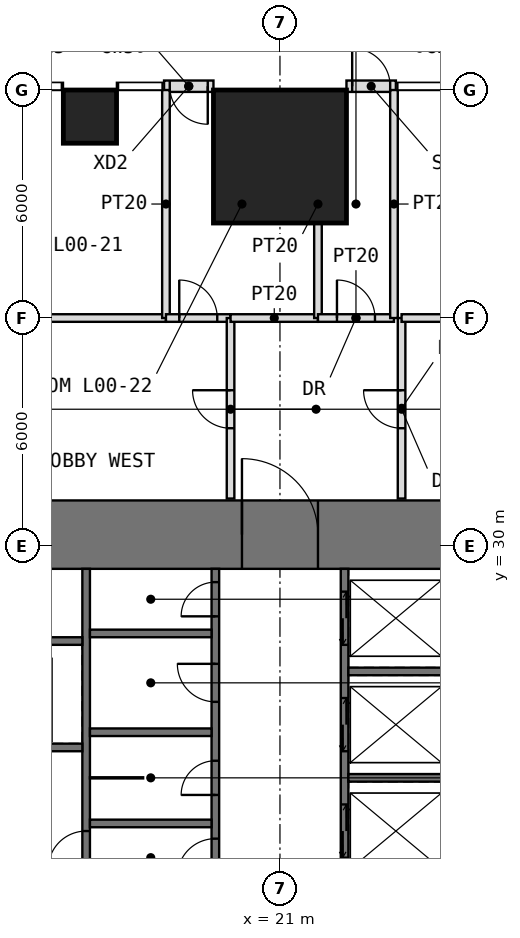
"""IFC4 building model, lengths in metres.
Left out: names, types, materials, properties, quantities, classifications, styles, units other than length and angle.
Written with IfcOpenShell. Run it as: python <this file> out.ifc"""

import sys

from ifc_helpers import new_model, si_unit, direction, frame, frame_2d, origin, origin_2d, place, context, subcontext, project, spatial, rectangle, extrude, element, fill, save


model = new_model("IFC4")
c1 = context("Model", 3, precision=1e-05, world=origin(), true_north=direction((0.0, 1.0)))
c2 = subcontext(c1, "Body", "Model", "MODEL_VIEW")
j1 = project(units=[si_unit("LENGTHUNIT", "METRE"), si_unit("PLANEANGLEUNIT", "RADIAN")], contexts=[c1])
p1 = place(None, origin())
s1 = spatial("IfcSite", under=j1, at=p1, CompositionType="ELEMENT")
p2 = place(p1, origin())
s2 = spatial("IfcBuilding", under=s1, at=p2, CompositionType="ELEMENT")
p3 = place(p2, origin())
s3 = spatial("IfcBuildingStorey", under=s2, at=p3, CompositionType="ELEMENT", Elevation=0.0)
p4 = place(p3, frame((16.0, 41.3, -0.4), z_axis=(0.0, 0.0, 1.0), x_axis=(1.0, 0.0, 0.0)))
e1 = element("IfcColumn", 1, at=p4, inside=s3, PredefinedType="COLUMN", context=c2, shape_type="SweptSolid", body=[
    extrude(rectangle(XDim=1.4, YDim=1.4, at=origin_2d()), origin(), (0.0, 0.0, 1.0), 6.4),
])
p5 = place(p3, frame((21.0, 40.25, -0.4), z_axis=(0.0, 0.0, 1.0), x_axis=(1.0, 0.0, 0.0)))
e2 = element("IfcColumn", 2, at=p5, inside=s3, PredefinedType="COLUMN", context=c2, shape_type="SweptSolid", body=[
    extrude(rectangle(XDim=3.5, YDim=3.5, at=origin_2d()), origin(), (0.0, 0.0, 1.0), 6.4),
])
p6 = place(p3, frame((22.75, 42.1, 0.0), z_axis=(0.0, 0.0, 1.0), x_axis=(1.0, 0.0, 0.0)))
e3 = element("IfcWall", 3, at=p6, inside=s3, PredefinedType="USERDEFINED", context=c2, shape_type="SweptSolid", body=[
    extrude(rectangle(XDim=1.3, YDim=0.3, at=frame_2d((0.65, 0.0))), origin(), (0.0, 0.0, 1.0), 5.6),
])
p7 = place(p6, frame((0.15, 0.0, 0.0)))
e4 = element("IfcOpeningElement", 4, at=p7, cuts=e3, PredefinedType="OPENING", context=c2, shape_type="SweptSolid", body=[
    extrude(rectangle(XDim=1.0, YDim=2.4, at=frame_2d((0.5, 1.2))), frame((0.0, 0.16, 0.0), z_axis=(0.0, -1.0, 0.0), x_axis=(1.0, 0.0, 0.0)), (0.0, 0.0, 1.0), 0.32),
])
p8 = place(p3, frame((19.25, 42.1, 0.0), z_axis=(0.0, 0.0, 1.0), x_axis=(-1.0, 0.0, 0.0)))
e5 = element("IfcWall", 5, at=p8, inside=s3, PredefinedType="USERDEFINED", context=c2, shape_type="SweptSolid", body=[
    extrude(rectangle(XDim=1.3, YDim=0.3, at=frame_2d((0.65, 0.0))), origin(), (0.0, 0.0, 1.0), 5.6),
])
p9 = place(p8, frame((0.15, 0.0, 0.0)))
e6 = element("IfcOpeningElement", 6, at=p9, cuts=e5, PredefinedType="OPENING", context=c2, shape_type="SweptSolid", body=[
    extrude(rectangle(XDim=1.0, YDim=2.4, at=frame_2d((0.5, 1.2))), frame((0.0, 0.16, 0.0), z_axis=(0.0, -1.0, 0.0), x_axis=(1.0, 0.0, 0.0)), (0.0, 0.0, 1.0), 0.32),
])
p10 = place(p3, frame((10.8, 30.3, 0.0), z_axis=(0.0, 0.0, 1.0), x_axis=(1.0, 0.0, 0.0)))
e7 = element("IfcWall", 7, at=p10, inside=s3, PredefinedType="SHEAR", context=c2, shape_type="SweptSolid", body=[
    extrude(rectangle(XDim=20.4, YDim=1.8, at=frame_2d((10.2, 0.0))), origin(), (0.0, 0.0, 1.0), 5.8),
])
p11 = place(p10, frame((9.2, 0.0, 0.0)))
e8 = element("IfcOpeningElement", 8, at=p11, cuts=e7, PredefinedType="OPENING", context=c2, shape_type="SweptSolid", body=[
    extrude(rectangle(XDim=2.0, YDim=2.2, at=frame_2d((1.0, 1.1))), frame((0.0, 0.91, 0.0), z_axis=(0.0, -1.0, 0.0), x_axis=(1.0, 0.0, 0.0)), (0.0, 0.0, 1.0), 1.82),
])
p12 = place(p3, frame((15.9, 12.6, 0.0), z_axis=(0.0, 0.0, 1.0), x_axis=(0.0, 1.0, 0.0)))
e9 = element("IfcWall", 9, at=p12, inside=s3, PredefinedType="SHEAR", context=c2, shape_type="SweptSolid", body=[
    extrude(rectangle(XDim=16.8, YDim=0.2, at=frame_2d((8.4, 0.0))), origin(), (0.0, 0.0, 1.0), 5.8),
])
p13 = place(p12, frame((8.9, 0.0, 0.0)))
e10 = element("IfcOpeningElement", 10, at=p13, cuts=e9, PredefinedType="OPENING", context=c2, shape_type="SweptSolid", body=[
    extrude(rectangle(XDim=1.0, YDim=2.2, at=frame_2d((0.5, 1.1))), frame((0.0, 0.11, 0.0), z_axis=(0.0, -1.0, 0.0), x_axis=(1.0, 0.0, 0.0)), (0.0, 0.0, 1.0), 0.22),
])
p14 = place(p3, frame((19.3, 12.6, 0.0), z_axis=(0.0, 0.0, 1.0), x_axis=(0.0, 1.0, 0.0)))
e11 = element("IfcWall", 11, at=p14, inside=s3, PredefinedType="SHEAR", context=c2, shape_type="SweptSolid", body=[
    extrude(rectangle(XDim=16.8, YDim=0.2, at=frame_2d((8.4, 0.0))), origin(), (0.0, 0.0, 1.0), 5.8),
])
p15 = place(p14, frame((8.7, 0.0, 0.0)))
e12 = element("IfcOpeningElement", 12, at=p15, cuts=e11, PredefinedType="OPENING", context=c2, shape_type="SweptSolid", body=[
    extrude(rectangle(XDim=1.0, YDim=2.2, at=frame_2d((0.5, 1.1))), frame((0.0, 0.11, 0.0), z_axis=(0.0, -1.0, 0.0), x_axis=(1.0, 0.0, 0.0)), (0.0, 0.0, 1.0), 0.22),
])
p16 = place(p14, frame((10.85, 0.0, 0.0)))
e13 = element("IfcOpeningElement", 13, at=p16, cuts=e11, PredefinedType="OPENING", context=c2, shape_type="SweptSolid", body=[
    extrude(rectangle(XDim=0.9, YDim=2.2, at=frame_2d((0.45, 1.1))), frame((0.0, 0.11, 0.0), z_axis=(0.0, -1.0, 0.0), x_axis=(1.0, 0.0, 0.0)), (0.0, 0.0, 1.0), 0.22),
])
p17 = place(p14, frame((13.3, 0.0, 0.0)))
e14 = element("IfcOpeningElement", 14, at=p17, cuts=e11, PredefinedType="OPENING", context=c2, shape_type="SweptSolid", body=[
    extrude(rectangle(XDim=1.0, YDim=2.2, at=frame_2d((0.5, 1.1))), frame((0.0, 0.11, 0.0), z_axis=(0.0, -1.0, 0.0), x_axis=(1.0, 0.0, 0.0)), (0.0, 0.0, 1.0), 0.22),
])
p18 = place(p14, frame((15.55, 0.0, 0.0)))
e15 = element("IfcOpeningElement", 15, at=p18, cuts=e11, PredefinedType="OPENING", context=c2, shape_type="SweptSolid", body=[
    extrude(rectangle(XDim=0.9, YDim=2.2, at=frame_2d((0.45, 1.1))), frame((0.0, 0.11, 0.0), z_axis=(0.0, -1.0, 0.0), x_axis=(1.0, 0.0, 0.0)), (0.0, 0.0, 1.0), 0.22),
])
p19 = place(p14, frame((0.75, 0.0, 0.0)))
e16 = element("IfcOpeningElement", 16, at=p19, cuts=e11, PredefinedType="OPENING", context=c2, shape_type="SweptSolid", body=[
    extrude(rectangle(XDim=1.1, YDim=2.2, at=frame_2d((0.55, 1.1))), frame((0.0, 0.11, 0.0), z_axis=(0.0, -1.0, 0.0), x_axis=(1.0, 0.0, 0.0)), (0.0, 0.0, 1.0), 0.22),
])
p20 = place(p14, frame((3.55, 0.0, 0.0)))
e17 = element("IfcOpeningElement", 17, at=p20, cuts=e11, PredefinedType="OPENING", context=c2, shape_type="SweptSolid", body=[
    extrude(rectangle(XDim=1.1, YDim=2.2, at=frame_2d((0.55, 1.1))), frame((0.0, 0.11, 0.0), z_axis=(0.0, -1.0, 0.0), x_axis=(1.0, 0.0, 0.0)), (0.0, 0.0, 1.0), 0.22),
])
p21 = place(p14, frame((6.35, 0.0, 0.0)))
e18 = element("IfcOpeningElement", 18, at=p21, cuts=e11, PredefinedType="OPENING", context=c2, shape_type="SweptSolid", body=[
    extrude(rectangle(XDim=1.1, YDim=2.2, at=frame_2d((0.55, 1.1))), frame((0.0, 0.11, 0.0), z_axis=(0.0, -1.0, 0.0), x_axis=(1.0, 0.0, 0.0)), (0.0, 0.0, 1.0), 0.22),
])
p22 = place(p3, frame((22.7, 12.6, 0.0), z_axis=(0.0, 0.0, 1.0), x_axis=(0.0, 1.0, 0.0)))
e19 = element("IfcWall", 19, at=p22, inside=s3, PredefinedType="SHEAR", context=c2, shape_type="SweptSolid", body=[
    extrude(rectangle(XDim=16.8, YDim=0.2, at=frame_2d((8.4, 0.0))), origin(), (0.0, 0.0, 1.0), 5.8),
])
p23 = place(p22, frame((7.1, 0.0, 0.0)))
e20 = element("IfcOpeningElement", 20, at=p23, cuts=e19, PredefinedType="OPENING", context=c2, shape_type="SweptSolid", body=[
    extrude(rectangle(XDim=1.0, YDim=2.2, at=frame_2d((0.5, 1.1))), frame((0.0, 0.11, 0.0), z_axis=(0.0, -1.0, 0.0), x_axis=(1.0, 0.0, 0.0)), (0.0, 0.0, 1.0), 0.22),
])
p24 = place(p22, frame((1.55, 0.0, 0.0)))
e21 = element("IfcOpeningElement", 21, at=p24, cuts=e19, PredefinedType="OPENING", context=c2, shape_type="SweptSolid", body=[
    extrude(rectangle(XDim=0.9, YDim=2.2, at=frame_2d((0.45, 1.1))), frame((0.0, 0.11, 0.0), z_axis=(0.0, -1.0, 0.0), x_axis=(1.0, 0.0, 0.0)), (0.0, 0.0, 1.0), 0.22),
])
p25 = place(p22, frame((4.95, 0.0, 0.0)))
e22 = element("IfcOpeningElement", 22, at=p25, cuts=e19, PredefinedType="OPENING", context=c2, shape_type="SweptSolid", body=[
    extrude(rectangle(XDim=0.9, YDim=2.2, at=frame_2d((0.45, 1.1))), frame((0.0, 0.11, 0.0), z_axis=(0.0, -1.0, 0.0), x_axis=(1.0, 0.0, 0.0)), (0.0, 0.0, 1.0), 0.22),
])
p26 = place(p22, frame((9.2, 0.0, 0.0)))
e23 = element("IfcOpeningElement", 23, at=p26, cuts=e19, PredefinedType="OPENING", context=c2, shape_type="SweptSolid", body=[
    extrude(rectangle(XDim=1.4, YDim=2.4, at=frame_2d((0.7, 1.2))), frame((0.0, 0.11, 0.0), z_axis=(0.0, -1.0, 0.0), x_axis=(1.0, 0.0, 0.0)), (0.0, 0.0, 1.0), 0.22),
])
p27 = place(p22, frame((12.0, 0.0, 0.0)))
e24 = element("IfcOpeningElement", 24, at=p27, cuts=e19, PredefinedType="OPENING", context=c2, shape_type="SweptSolid", body=[
    extrude(rectangle(XDim=1.4, YDim=2.4, at=frame_2d((0.7, 1.2))), frame((0.0, 0.11, 0.0), z_axis=(0.0, -1.0, 0.0), x_axis=(1.0, 0.0, 0.0)), (0.0, 0.0, 1.0), 0.22),
])
p28 = place(p22, frame((14.8, 0.0, 0.0)))
e25 = element("IfcOpeningElement", 25, at=p28, cuts=e19, PredefinedType="OPENING", context=c2, shape_type="SweptSolid", body=[
    extrude(rectangle(XDim=1.4, YDim=2.4, at=frame_2d((0.7, 1.2))), frame((0.0, 0.11, 0.0), z_axis=(0.0, -1.0, 0.0), x_axis=(1.0, 0.0, 0.0)), (0.0, 0.0, 1.0), 0.22),
])
p29 = place(p3, frame((12.6, 24.7, 0.0), z_axis=(0.0, 0.0, 1.0), x_axis=(1.0, 0.0, 0.0)))
e26 = element("IfcWall", 26, at=p29, inside=s3, PredefinedType="SHEAR", context=c2, shape_type="SweptSolid", body=[
    extrude(rectangle(XDim=3.2, YDim=0.2, at=frame_2d((1.6, 0.0))), origin(), (0.0, 0.0, 1.0), 5.8),
])
p30 = place(p29, frame((1.0, 0.0, 0.0)))
e27 = element("IfcOpeningElement", 27, at=p30, cuts=e26, PredefinedType="OPENING", context=c2, shape_type="SweptSolid", body=[
    extrude(rectangle(XDim=1.2, YDim=2.2, at=frame_2d((0.6, 1.1))), frame((0.0, 0.11, 0.0), z_axis=(0.0, -1.0, 0.0), x_axis=(1.0, 0.0, 0.0)), (0.0, 0.0, 1.0), 0.22),
])
for number, where, z_axis, x_axis in (
    (28, (12.6, 27.5, 0.0), (0.0, 0.0, 1.0), (1.0, 0.0, 0.0)),
    (29, (16.0, 22.7, 0.0), (0.0, 0.0, 1.0), (1.0, 0.0, 0.0)),
    (30, (16.0, 25.1, 0.0), (0.0, 0.0, 1.0), (1.0, 0.0, 0.0)),
    (31, (16.0, 27.7, 0.0), (0.0, 0.0, 1.0), (1.0, 0.0, 0.0)),
    (32, (22.8, 23.9, 0.0), (0.0, 0.0, 1.0), (1.0, 0.0, 0.0)),
    (33, (22.8, 26.7, 0.0), (0.0, 0.0, 1.0), (1.0, 0.0, 0.0)),
):
    element("IfcWall", number, at=place(p3, frame(where, z_axis=z_axis, x_axis=x_axis)), inside=s3, PredefinedType="SHEAR", context=c2, shape_type="SweptSolid", body=[
        extrude(rectangle(XDim=3.2, YDim=0.2, at=frame_2d((1.6, 0.0))), origin(), (0.0, 0.0, 1.0), 5.8),
    ])
p31 = place(p3, frame((16.0, 23.9, 0.0), z_axis=(0.0, 0.0, 1.0), x_axis=(1.0, 0.0, 0.0)))
e34 = element("IfcWall", 34, at=p31, inside=s3, PredefinedType="PARTITIONING", context=c2, shape_type="SweptSolid", body=[
    extrude(rectangle(XDim=1.4, YDim=0.03, at=frame_2d((0.7, 0.0))), origin(), (0.0, 0.0, 1.0), 5.6),
])
p32 = place(p3, frame((9.0, 36.0, 0.0), z_axis=(0.0, 0.0, 1.0), x_axis=(1.0, 0.0, 0.0)))
e35 = element("IfcWall", 35, at=p32, inside=s3, PredefinedType="PARTITIONING", context=c2, shape_type="SweptSolid", body=[
    extrude(rectangle(XDim=9.0, YDim=0.2, at=frame_2d((4.5, 0.0))), origin(), (0.0, 0.0, 1.0), 5.6),
])
p33 = place(p32, frame((4.0, 0.0, 0.0)))
e36 = element("IfcOpeningElement", 36, at=p33, cuts=e35, PredefinedType="OPENING", context=c2, shape_type="SweptSolid", body=[
    extrude(rectangle(XDim=1.0, YDim=2.2, at=frame_2d((0.5, 1.1))), frame((0.0, 0.11, 0.0), z_axis=(0.0, -1.0, 0.0), x_axis=(1.0, 0.0, 0.0)), (0.0, 0.0, 1.0), 0.22),
])
p34 = place(p3, frame((18.0, 36.0, 0.0), z_axis=(0.0, 0.0, 1.0), x_axis=(0.0, 1.0, 0.0)))
e37 = element("IfcWall", 37, at=p34, inside=s3, PredefinedType="PARTITIONING", context=c2, shape_type="SweptSolid", body=[
    extrude(rectangle(XDim=6.0, YDim=0.2, at=frame_2d((3.0, 0.0))), origin(), (0.0, 0.0, 1.0), 5.6),
])
p35 = place(p3, frame((18.0, 36.0, 0.0), z_axis=(0.0, 0.0, 1.0), x_axis=(1.0, 0.0, 0.0)))
e38 = element("IfcWall", 38, at=p35, inside=s3, PredefinedType="PARTITIONING", context=c2, shape_type="SweptSolid", body=[
    extrude(rectangle(XDim=1.7, YDim=0.2, at=frame_2d((0.85, 0.0))), origin(), (0.0, 0.0, 1.0), 5.6),
])
p36 = place(p35, frame((0.35, 0.0, 0.0)))
e39 = element("IfcOpeningElement", 39, at=p36, cuts=e38, PredefinedType="OPENING", context=c2, shape_type="SweptSolid", body=[
    extrude(rectangle(XDim=1.0, YDim=2.2, at=frame_2d((0.5, 1.1))), frame((0.0, 0.11, 0.0), z_axis=(0.0, -1.0, 0.0), x_axis=(1.0, 0.0, 0.0)), (0.0, 0.0, 1.0), 0.22),
])
p37 = place(p3, frame((19.7, 31.25, 0.0), z_axis=(0.0, 0.0, 1.0), x_axis=(0.0, 1.0, 0.0)))
e40 = element("IfcWall", 40, at=p37, inside=s3, PredefinedType="PARTITIONING", context=c2, shape_type="SweptSolid", body=[
    extrude(rectangle(XDim=4.75, YDim=0.2, at=frame_2d((2.375, 0.0))), origin(), (0.0, 0.0, 1.0), 5.6),
])
p38 = place(p37, frame((1.85, 0.0, 0.0)))
e41 = element("IfcOpeningElement", 41, at=p38, cuts=e40, PredefinedType="OPENING", context=c2, shape_type="SweptSolid", body=[
    extrude(rectangle(XDim=1.0, YDim=2.2, at=frame_2d((0.5, 1.1))), frame((0.0, 0.11, 0.0), z_axis=(0.0, -1.0, 0.0), x_axis=(1.0, 0.0, 0.0)), (0.0, 0.0, 1.0), 0.22),
])
p39 = place(p3, frame((19.7, 36.0, 0.0), z_axis=(0.0, 0.0, 1.0), x_axis=(1.0, 0.0, 0.0)))
e42 = element("IfcWall", 42, at=p39, inside=s3, PredefinedType="PARTITIONING", context=c2, shape_type="SweptSolid", body=[
    extrude(rectangle(XDim=2.3, YDim=0.2, at=frame_2d((1.15, 0.0))), origin(), (0.0, 0.0, 1.0), 5.6),
])
p40 = place(p3, frame((22.0, 36.0, 0.0), z_axis=(0.0, 0.0, 1.0), x_axis=(0.0, 1.0, 0.0)))
e43 = element("IfcWall", 43, at=p40, inside=s3, PredefinedType="PARTITIONING", context=c2, shape_type="SweptSolid", body=[
    extrude(rectangle(XDim=6.0, YDim=0.2, at=frame_2d((3.0, 0.0))), origin(), (0.0, 0.0, 1.0), 5.6),
])
p41 = place(p3, frame((22.0, 36.0, 0.0), z_axis=(0.0, 0.0, 1.0), x_axis=(1.0, 0.0, 0.0)))
e44 = element("IfcWall", 44, at=p41, inside=s3, PredefinedType="PARTITIONING", context=c2, shape_type="SweptSolid", body=[
    extrude(rectangle(XDim=2.0, YDim=0.2, at=frame_2d((1.0, 0.0))), origin(), (0.0, 0.0, 1.0), 5.6),
])
p42 = place(p41, frame((0.5, 0.0, 0.0)))
e45 = element("IfcOpeningElement", 45, at=p42, cuts=e44, PredefinedType="OPENING", context=c2, shape_type="SweptSolid", body=[
    extrude(rectangle(XDim=1.0, YDim=2.2, at=frame_2d((0.5, 1.1))), frame((0.0, 0.11, 0.0), z_axis=(0.0, -1.0, 0.0), x_axis=(1.0, 0.0, 0.0)), (0.0, 0.0, 1.0), 0.22),
])
p43 = place(p3, frame((24.0, 36.0, 0.0), z_axis=(0.0, 0.0, 1.0), x_axis=(0.0, 1.0, 0.0)))
e46 = element("IfcWall", 46, at=p43, inside=s3, PredefinedType="PARTITIONING", context=c2, shape_type="SweptSolid", body=[
    extrude(rectangle(XDim=6.0, YDim=0.2, at=frame_2d((3.0, 0.0))), origin(), (0.0, 0.0, 1.0), 5.6),
])
p44 = place(p3, frame((24.2, 31.25, 0.0), z_axis=(0.0, 0.0, 1.0), x_axis=(0.0, 1.0, 0.0)))
e47 = element("IfcWall", 47, at=p44, inside=s3, PredefinedType="PARTITIONING", context=c2, shape_type="SweptSolid", body=[
    extrude(rectangle(XDim=4.75, YDim=0.2, at=frame_2d((2.375, 0.0))), origin(), (0.0, 0.0, 1.0), 5.6),
])
p45 = place(p44, frame((1.85, 0.0, 0.0)))
e48 = element("IfcOpeningElement", 48, at=p45, cuts=e47, PredefinedType="OPENING", context=c2, shape_type="SweptSolid", body=[
    extrude(rectangle(XDim=1.0, YDim=2.2, at=frame_2d((0.5, 1.1))), frame((0.0, 0.11, 0.0), z_axis=(0.0, -1.0, 0.0), x_axis=(1.0, 0.0, 0.0)), (0.0, 0.0, 1.0), 0.22),
])
p46 = place(p3, frame((24.2, 36.0, 0.0), z_axis=(0.0, 0.0, 1.0), x_axis=(1.0, 0.0, 0.0)))
e49 = element("IfcWall", 49, at=p46, inside=s3, PredefinedType="PARTITIONING", context=c2, shape_type="SweptSolid", body=[
    extrude(rectangle(XDim=8.8, YDim=0.2, at=frame_2d((4.4, 0.0))), origin(), (0.0, 0.0, 1.0), 5.6),
])
p47 = place(p46, frame((3.8, 0.0, 0.0)))
e50 = element("IfcOpeningElement", 50, at=p47, cuts=e49, PredefinedType="OPENING", context=c2, shape_type="SweptSolid", body=[
    extrude(rectangle(XDim=1.0, YDim=2.2, at=frame_2d((0.5, 1.1))), frame((0.0, 0.11, 0.0), z_axis=(0.0, -1.0, 0.0), x_axis=(1.0, 0.0, 0.0)), (0.0, 0.0, 1.0), 0.22),
])
p48 = place(p7, origin())
e51 = element("IfcDoor", 51, at=p48, inside=s3, OperationType="SINGLE_SWING_LEFT", PredefinedType="DOOR", context=c2, shape_type="SweptSolid", body=[
    extrude(rectangle(XDim=1.0, YDim=2.4, at=frame_2d((0.5, 1.2))), frame((0.0, 0.025, 0.0), z_axis=(0.0, -1.0, 0.0), x_axis=(1.0, 0.0, 0.0)), (0.0, 0.0, 1.0), 0.05),
])
fill(e4, e51)
p49 = place(p9, origin())
e52 = element("IfcDoor", 52, at=p49, inside=s3, OperationType="SINGLE_SWING_LEFT", PredefinedType="DOOR", context=c2, shape_type="SweptSolid", body=[
    extrude(rectangle(XDim=1.0, YDim=2.4, at=frame_2d((0.5, 1.2))), frame((0.0, 0.025, 0.0), z_axis=(0.0, -1.0, 0.0), x_axis=(1.0, 0.0, 0.0)), (0.0, 0.0, 1.0), 0.05),
])
fill(e6, e52)
p50 = place(p11, origin())
e53 = element("IfcDoor", 53, at=p50, inside=s3, OperationType="DOUBLE_DOOR_SINGLE_SWING", PredefinedType="DOOR", context=c2, shape_type="SweptSolid", body=[
    extrude(rectangle(XDim=2.0, YDim=2.2, at=frame_2d((1.0, 1.1))), frame((0.0, 0.025, 0.0), z_axis=(0.0, -1.0, 0.0), x_axis=(1.0, 0.0, 0.0)), (0.0, 0.0, 1.0), 0.05),
])
fill(e8, e53)
p51 = place(p13, origin())
e54 = element("IfcDoor", 54, at=p51, inside=s3, OperationType="SINGLE_SWING_LEFT", PredefinedType="DOOR", context=c2, shape_type="SweptSolid", body=[
    extrude(rectangle(XDim=1.0, YDim=2.2, at=frame_2d((0.5, 1.1))), frame((0.0, 0.025, 0.0), z_axis=(0.0, -1.0, 0.0), x_axis=(1.0, 0.0, 0.0)), (0.0, 0.0, 1.0), 0.05),
])
fill(e10, e54)
p52 = place(p15, origin())
e55 = element("IfcDoor", 55, at=p52, inside=s3, OperationType="SINGLE_SWING_LEFT", PredefinedType="DOOR", context=c2, shape_type="SweptSolid", body=[
    extrude(rectangle(XDim=1.0, YDim=2.2, at=frame_2d((0.5, 1.1))), frame((0.0, 0.025, 0.0), z_axis=(0.0, -1.0, 0.0), x_axis=(1.0, 0.0, 0.0)), (0.0, 0.0, 1.0), 0.05),
])
fill(e12, e55)
p53 = place(p16, origin())
e56 = element("IfcDoor", 56, at=p53, inside=s3, OperationType="SINGLE_SWING_LEFT", PredefinedType="DOOR", context=c2, shape_type="SweptSolid", body=[
    extrude(rectangle(XDim=0.9, YDim=2.2, at=frame_2d((0.45, 1.1))), frame((0.0, 0.025, 0.0), z_axis=(0.0, -1.0, 0.0), x_axis=(1.0, 0.0, 0.0)), (0.0, 0.0, 1.0), 0.05),
])
fill(e13, e56)
p54 = place(p17, origin())
e57 = element("IfcDoor", 57, at=p54, inside=s3, OperationType="SINGLE_SWING_RIGHT", PredefinedType="DOOR", context=c2, shape_type="SweptSolid", body=[
    extrude(rectangle(XDim=1.0, YDim=2.2, at=frame_2d((0.5, 1.1))), frame((0.0, 0.025, 0.0), z_axis=(0.0, -1.0, 0.0), x_axis=(1.0, 0.0, 0.0)), (0.0, 0.0, 1.0), 0.05),
])
fill(e14, e57)
p55 = place(p18, origin())
e58 = element("IfcDoor", 58, at=p55, inside=s3, OperationType="SINGLE_SWING_LEFT", PredefinedType="DOOR", context=c2, shape_type="SweptSolid", body=[
    extrude(rectangle(XDim=0.9, YDim=2.2, at=frame_2d((0.45, 1.1))), frame((0.0, 0.025, 0.0), z_axis=(0.0, -1.0, 0.0), x_axis=(1.0, 0.0, 0.0)), (0.0, 0.0, 1.0), 0.05),
])
fill(e15, e58)
p56 = place(p36, origin())
e59 = element("IfcDoor", 59, at=p56, inside=s3, OperationType="SINGLE_SWING_LEFT", PredefinedType="DOOR", context=c2, shape_type="SweptSolid", body=[
    extrude(rectangle(XDim=1.0, YDim=2.2, at=frame_2d((0.5, 1.1))), frame((0.0, 0.025, 0.0), z_axis=(0.0, -1.0, 0.0), x_axis=(1.0, 0.0, 0.0)), (0.0, 0.0, 1.0), 0.05),
])
fill(e39, e59)
p57 = place(p38, origin())
e60 = element("IfcDoor", 60, at=p57, inside=s3, OperationType="SINGLE_SWING_RIGHT", PredefinedType="DOOR", context=c2, shape_type="SweptSolid", body=[
    extrude(rectangle(XDim=1.0, YDim=2.2, at=frame_2d((0.5, 1.1))), frame((0.0, 0.025, 0.0), z_axis=(0.0, -1.0, 0.0), x_axis=(1.0, 0.0, 0.0)), (0.0, 0.0, 1.0), 0.05),
])
fill(e41, e60)
p58 = place(p42, origin())
e61 = element("IfcDoor", 61, at=p58, inside=s3, OperationType="SINGLE_SWING_LEFT", PredefinedType="DOOR", context=c2, shape_type="SweptSolid", body=[
    extrude(rectangle(XDim=1.0, YDim=2.2, at=frame_2d((0.5, 1.1))), frame((0.0, 0.025, 0.0), z_axis=(0.0, -1.0, 0.0), x_axis=(1.0, 0.0, 0.0)), (0.0, 0.0, 1.0), 0.05),
])
fill(e45, e61)
p59 = place(p45, origin())
e62 = element("IfcDoor", 62, at=p59, inside=s3, OperationType="SINGLE_SWING_RIGHT", PredefinedType="DOOR", context=c2, shape_type="SweptSolid", body=[
    extrude(rectangle(XDim=1.0, YDim=2.2, at=frame_2d((0.5, 1.1))), frame((0.0, 0.025, 0.0), z_axis=(0.0, -1.0, 0.0), x_axis=(1.0, 0.0, 0.0)), (0.0, 0.0, 1.0), 0.05),
])
fill(e48, e62)
p60 = place(p26, origin())
e63 = element("IfcDoor", 63, at=p60, inside=s3, OperationType="DOUBLE_DOOR_SLIDING", PredefinedType="DOOR", context=c2, shape_type="SweptSolid", body=[
    extrude(rectangle(XDim=1.4, YDim=2.4, at=frame_2d((0.7, 1.2))), frame((0.0, 0.025, 0.0), z_axis=(0.0, -1.0, 0.0), x_axis=(1.0, 0.0, 0.0)), (0.0, 0.0, 1.0), 0.05),
])
fill(e23, e63)
p61 = place(p27, origin())
e64 = element("IfcDoor", 64, at=p61, inside=s3, OperationType="DOUBLE_DOOR_SLIDING", PredefinedType="DOOR", context=c2, shape_type="SweptSolid", body=[
    extrude(rectangle(XDim=1.4, YDim=2.4, at=frame_2d((0.7, 1.2))), frame((0.0, 0.025, 0.0), z_axis=(0.0, -1.0, 0.0), x_axis=(1.0, 0.0, 0.0)), (0.0, 0.0, 1.0), 0.05),
])
fill(e24, e64)
p62 = place(p28, origin())
e65 = element("IfcDoor", 65, at=p62, inside=s3, OperationType="DOUBLE_DOOR_SLIDING", PredefinedType="DOOR", context=c2, shape_type="SweptSolid", body=[
    extrude(rectangle(XDim=1.4, YDim=2.4, at=frame_2d((0.7, 1.2))), frame((0.0, 0.025, 0.0), z_axis=(0.0, -1.0, 0.0), x_axis=(1.0, 0.0, 0.0)), (0.0, 0.0, 1.0), 0.05),
])
fill(e25, e65)
save(model, sys.argv[1])
